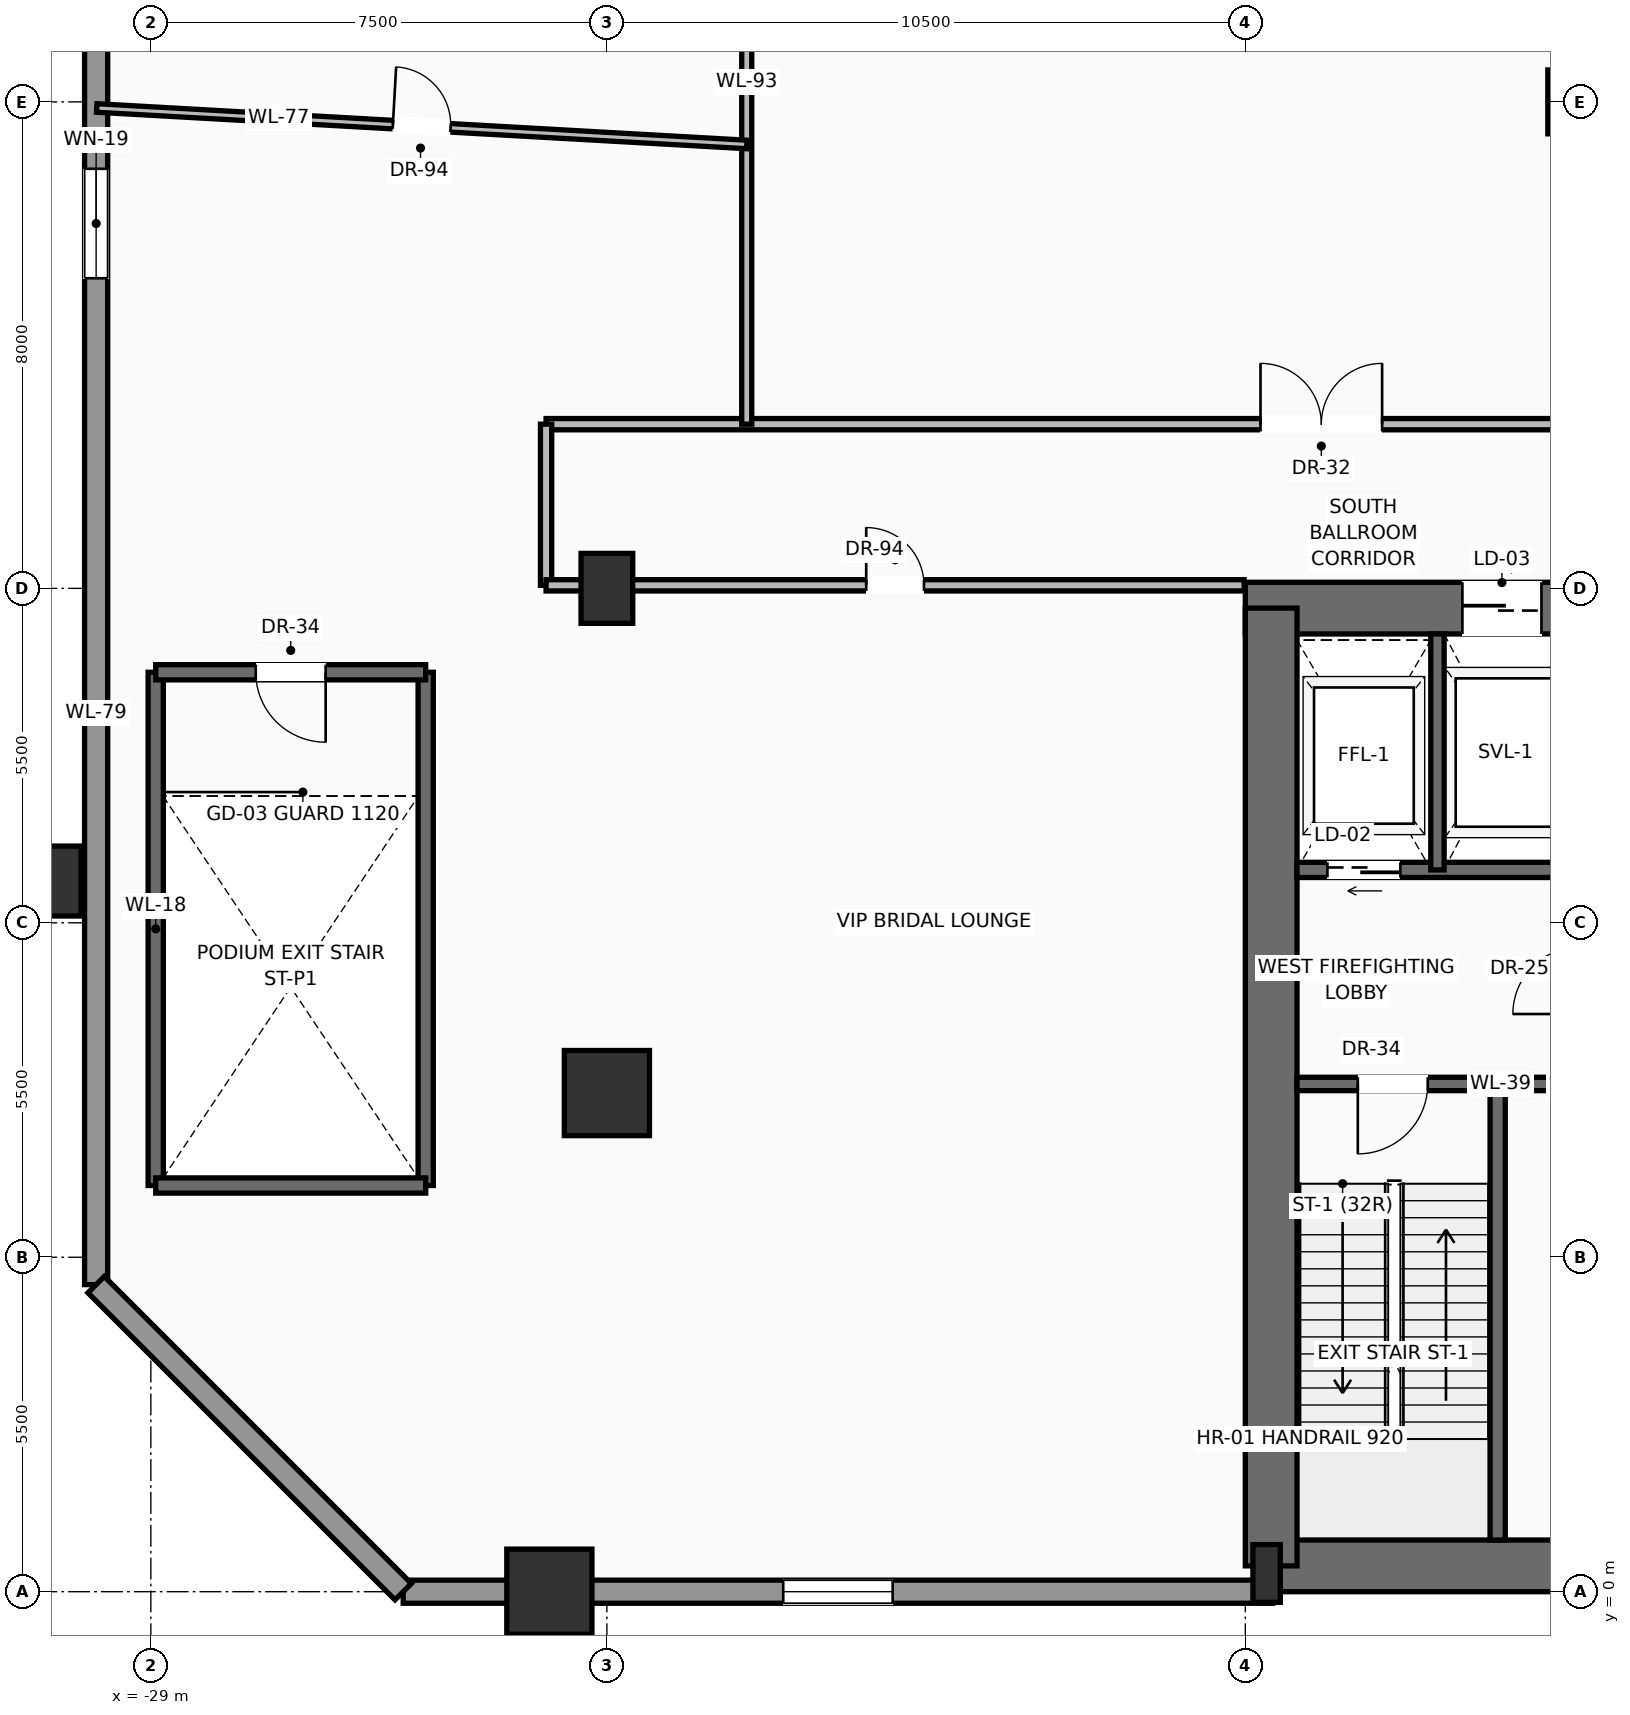
"""IFC4 building model, lengths in metres.
Left out: names, types, materials, properties, quantities, classifications, styles, units other than length and angle.
Written with IfcOpenShell. Run it as: python <this file> out.ifc"""

import sys

from ifc_helpers import new_model, si_unit, direction, frame, frame_2d, origin, origin_2d, place, context, subcontext, project, spatial, rectangle, hollow_rectangle, extrude, source, transform, mapped, element, fill, save


model = new_model("IFC4")
c1 = context("Model", 3, precision=1e-05, world=origin(), true_north=direction((0.0, 1.0)))
c2 = subcontext(c1, "Body", "Model", "MODEL_VIEW")
j1 = project(units=[si_unit("LENGTHUNIT", "METRE"), si_unit("PLANEANGLEUNIT", "RADIAN")], contexts=[c1])
p1 = place(None, origin())
s1 = spatial("IfcSite", under=j1, at=p1, CompositionType="ELEMENT")
p2 = place(p1, origin())
s2 = spatial("IfcBuilding", under=s1, at=p2, CompositionType="ELEMENT")
p3 = place(p2, frame((0.0, 0.0, 16.5)))
s3 = spatial("IfcBuildingStorey", under=s2, at=p3, CompositionType="ELEMENT", Elevation=16.5)
p4 = place(p3, frame((-10.65, 0.425, 0.0), z_axis=(0.0, 0.0, 1.0), x_axis=(1.0, 0.0, 0.0)))
e1 = element("IfcWall", 1, at=p4, inside=s3, PredefinedType="SHEAR", context=c2, shape_type="SweptSolid", body=[
    extrude(rectangle(XDim=21.3, YDim=0.85, at=frame_2d((10.65, 0.0))), origin(), (0.0, 0.0, 1.0), 5.05),
])
p5 = place(p3, frame((-11.0, 16.175, 0.0), z_axis=(0.0, 0.0, 1.0), x_axis=(1.0, 0.0, 0.0)))
e2 = element("IfcWall", 2, at=p5, inside=s3, PredefinedType="SHEAR", context=c2, shape_type="SweptSolid", body=[
    extrude(rectangle(XDim=22.0, YDim=0.85, at=frame_2d((11.0, 0.0))), origin(), (0.0, 0.0, 1.0), 5.05),
])
p6 = place(p5, frame((3.57, 0.0, 0.0)))
e3 = element("IfcOpeningElement", 3, at=p6, cuts=e2, PredefinedType="OPENING", context=c2, shape_type="SweptSolid", body=[
    extrude(rectangle(XDim=1.3, YDim=2.3, at=frame_2d((0.65, 1.15))), frame((0.0, 0.435, 0.0), z_axis=(0.0, -1.0, 0.0), x_axis=(1.0, 0.0, 0.0)), (0.0, 0.0, 1.0), 0.87),
])
p7 = place(p5, frame((10.0, 0.0, 0.0)))
e4 = element("IfcOpeningElement", 4, at=p7, cuts=e2, PredefinedType="OPENING", context=c2, shape_type="SweptSolid", body=[
    extrude(rectangle(XDim=2.0, YDim=2.4, at=frame_2d((1.0, 1.2))), frame((0.0, 0.435, 0.0), z_axis=(0.0, -1.0, 0.0), x_axis=(1.0, 0.0, 0.0)), (0.0, 0.0, 1.0), 0.87),
])
p8 = place(p3, frame((-10.575, 0.425, 0.0), z_axis=(0.0, 0.0, 1.0), x_axis=(0.0, 1.0, 0.0)))
e5 = element("IfcWall", 5, at=p8, inside=s3, PredefinedType="SHEAR", context=c2, shape_type="SweptSolid", body=[
    extrude(rectangle(XDim=15.75, YDim=0.85, at=frame_2d((7.875, 0.0))), origin(), (0.0, 0.0, 1.0), 5.05),
])
m1 = source(origin(), c2, "Body", "SweptSolid", [
    extrude(rectangle(XDim=0.45, YDim=0.95, at=origin_2d()), origin(), (0.0, 0.0, 1.0), 5.5),
])
p9 = place(p3, frame((-10.65, 0.3, 0.0), z_axis=(0.0, 0.0, 1.0), x_axis=(1.0, 0.0, 0.0)))
e6 = element("IfcColumn", 6, at=p9, inside=s3, PredefinedType="PILASTER", context=c2, shape_type="MappedRepresentation", body=[
    mapped(m1, transform((0.0, 0.0, 0.0), scale=1.0)),
])
m2 = source(origin(), c2, "Body", "SweptSolid", [
    extrude(rectangle(XDim=1.05, YDim=1.05, at=origin_2d()), origin(), (0.0, 0.0, 1.0), 5.5),
])
p10 = place(p3, frame((-5.5, 24.5, 0.0), z_axis=(0.0, 0.0, 1.0), x_axis=(1.0, 0.0, 0.0)))
e7 = element("IfcColumn", 7, at=p10, inside=s3, PredefinedType="COLUMN", context=c2, shape_type="MappedRepresentation", body=[
    mapped(m2, transform((0.0, 0.0, 0.0), scale=1.0)),
])
m3 = source(origin(), c2, "Body", "SweptSolid", [
    extrude(hollow_rectangle(XDim=1.4, YDim=1.4, WallThickness=0.07, at=origin_2d()), origin(), (0.0, 0.0, 1.0), 5.5),
])
for number, where, z_axis, x_axis in (
    (8, (-22.446, 0.0, 0.0), (0.0, 0.0, 1.0), (1.0, 0.0, 0.0)),
    (9, (-21.5, 8.2, 0.0), (0.0, 0.0, 1.0), (1.0, 0.0, 0.0)),
):
    element("IfcColumn", number, at=place(p3, frame(where, z_axis=z_axis, x_axis=x_axis)), inside=s3, PredefinedType="COLUMN", context=c2, shape_type="MappedRepresentation", body=[
        mapped(m3, transform((0.0, 0.0, 0.0), scale=1.0)),
    ])
m4 = source(origin(), c2, "Body", "SweptSolid", [
    extrude(rectangle(XDim=0.85, YDim=1.15, at=origin_2d()), origin(), (0.0, 0.0, 1.0), 5.5),
])
for number, where, z_axis, x_axis in (
    (10, (-21.5, 16.5, 0.0), (0.0, 0.0, 1.0), (1.0, 0.0, 0.0)),
    (11, (-30.573, 11.687, 0.0), (0.0, 0.0, 1.0), (1.0, 0.0, 0.0)),
):
    element("IfcColumn", number, at=place(p3, frame(where, z_axis=z_axis, x_axis=x_axis)), inside=s3, PredefinedType="COLUMN", context=c2, shape_type="MappedRepresentation", body=[
        mapped(m4, transform((0.0, 0.0, 0.0), scale=1.0)),
    ])
p11 = place(p3, frame((-29.9, 5.05, 0.0), z_axis=(0.0, 0.0, 1.0), x_axis=(0.0, 1.0, 0.0)))
e12 = element("IfcWall", 12, at=p11, inside=s3, PredefinedType="SOLIDWALL", context=c2, shape_type="SweptSolid", body=[
    extrude(rectangle(XDim=33.6, YDim=0.38, at=frame_2d((16.8, 0.0))), origin(), (0.0, 0.0, 1.0), 3.99),
])
p12 = place(p11, frame((16.55, 0.0, 0.95)))
e13 = element("IfcOpeningElement", 13, at=p12, cuts=e12, PredefinedType="OPENING", context=c2, shape_type="SweptSolid", body=[
    extrude(rectangle(XDim=1.8, YDim=2.4, at=frame_2d((0.9, 1.2))), frame((0.0, 0.2, 0.0), z_axis=(0.0, -1.0, 0.0), x_axis=(1.0, 0.0, 0.0)), (0.0, 0.0, 1.0), 0.4),
])
p13 = place(p11, frame((27.05, 0.0, 0.95)))
e14 = element("IfcOpeningElement", 14, at=p13, cuts=e12, PredefinedType="OPENING", context=c2, shape_type="SweptSolid", body=[
    extrude(rectangle(XDim=1.8, YDim=2.4, at=frame_2d((0.9, 1.2))), frame((0.0, 0.2, 0.0), z_axis=(0.0, -1.0, 0.0), x_axis=(1.0, 0.0, 0.0)), (0.0, 0.0, 1.0), 0.4),
])
p14 = place(p3, frame((-10.55, 0.0, 0.0), z_axis=(0.0, 0.0, 1.0), x_axis=(-1.0, 0.0, 0.0)))
e15 = element("IfcWall", 15, at=p14, inside=s3, PredefinedType="SOLIDWALL", context=c2, shape_type="SweptSolid", body=[
    extrude(rectangle(XDim=14.3, YDim=0.38, at=frame_2d((7.15, 0.0))), origin(), (0.0, 0.0, 1.0), 3.99),
])
p15 = place(p14, frame((6.25, 0.0, 0.95)))
e16 = element("IfcOpeningElement", 16, at=p15, cuts=e15, PredefinedType="OPENING", context=c2, shape_type="SweptSolid", body=[
    extrude(rectangle(XDim=1.8, YDim=2.4, at=frame_2d((0.9, 1.2))), frame((0.0, 0.2, 0.0), z_axis=(0.0, -1.0, 0.0), x_axis=(1.0, 0.0, 0.0)), (0.0, 0.0, 1.0), 0.4),
])
p16 = place(p3, frame((-24.85, 0.0, 0.0), z_axis=(0.0, 0.0, 1.0), x_axis=(-0.707089688307, 0.707123873653, 0.0)))
e17 = element("IfcWall", 17, at=p16, inside=s3, PredefinedType="SOLIDWALL", context=c2, shape_type="SweptSolid", body=[
    extrude(rectangle(XDim=7.142, YDim=0.38, at=frame_2d((3.571, 0.0))), origin(), (0.0, 0.0, 1.0), 3.99),
])
p17 = place(p3, frame((-6.85, 0.85, 0.0), z_axis=(0.0, 0.0, 1.0), x_axis=(0.0, 1.0, 0.0)))
e18 = element("IfcWall", 18, at=p17, inside=s3, PredefinedType="SOLIDWALL", context=c2, shape_type="SweptSolid", body=[
    extrude(rectangle(XDim=7.5, YDim=0.25, at=frame_2d((3.75, 0.0))), origin(), (0.0, 0.0, 1.0), 5.05),
])
p18 = place(p3, frame((-5.5, 8.35, 0.0), z_axis=(0.0, 0.0, 1.0), x_axis=(-1.0, 0.0, 0.0)))
e19 = element("IfcWall", 19, at=p18, inside=s3, PredefinedType="SOLIDWALL", context=c2, shape_type="SweptSolid", body=[
    extrude(rectangle(XDim=4.65, YDim=0.22, at=frame_2d((2.325, 0.0))), origin(), (0.0, 0.0, 1.0), 5.05),
])
p19 = place(p18, frame((2.5, 0.0, 0.0)))
e20 = element("IfcOpeningElement", 20, at=p19, cuts=e19, PredefinedType="OPENING", context=c2, shape_type="SweptSolid", body=[
    extrude(rectangle(XDim=1.15, YDim=2.2, at=frame_2d((0.575, 1.1))), frame((0.0, 0.12, 0.0), z_axis=(0.0, -1.0, 0.0), x_axis=(1.0, 0.0, 0.0)), (0.0, 0.0, 1.0), 0.24),
])
p20 = place(p3, frame((-5.5, 11.87, 0.0), z_axis=(0.0, 0.0, 1.0), x_axis=(-1.0, 0.0, 0.0)))
e21 = element("IfcWall", 21, at=p20, inside=s3, PredefinedType="SOLIDWALL", context=c2, shape_type="SweptSolid", body=[
    extrude(rectangle(XDim=4.65, YDim=0.25, at=frame_2d((2.325, 0.0))), origin(), (0.0, 0.0, 1.0), 5.05),
])
p21 = place(p20, frame((2.95, 0.0, 0.0)))
e22 = element("IfcOpeningElement", 22, at=p21, cuts=e21, PredefinedType="OPENING", context=c2, shape_type="SweptSolid", body=[
    extrude(rectangle(XDim=1.2, YDim=2.25, at=frame_2d((0.6, 1.125))), frame((0.0, 0.135, 0.0), z_axis=(0.0, -1.0, 0.0), x_axis=(1.0, 0.0, 0.0)), (0.0, 0.0, 1.0), 0.27),
])
p22 = place(p3, frame((-7.84, 11.87, 0.0), z_axis=(0.0, 0.0, 1.0), x_axis=(0.0, 1.0, 0.0)))
e23 = element("IfcWall", 23, at=p22, inside=s3, PredefinedType="SOLIDWALL", context=c2, shape_type="SweptSolid", body=[
    extrude(rectangle(XDim=3.88, YDim=0.22, at=frame_2d((1.94, 0.0))), origin(), (0.0, 0.0, 1.0), 5.05),
])
for number, where, z_axis, x_axis in (
    (24, (-28.92, 6.68, 0.0), (0.0, 0.0, 1.0), (0.0, 1.0, 0.0)),
    (25, (-24.48, 6.68, 0.0), (0.0, 0.0, 1.0), (0.0, 1.0, 0.0)),
):
    element("IfcWall", number, at=place(p3, frame(where, z_axis=z_axis, x_axis=x_axis)), inside=s3, PredefinedType="SOLIDWALL", context=c2, shape_type="SweptSolid", body=[
        extrude(rectangle(XDim=8.44, YDim=0.25, at=frame_2d((4.22, 0.0))), origin(), (0.0, 0.0, 1.0), 5.05),
    ])
p23 = place(p3, frame((-28.92, 6.68, 0.0), z_axis=(0.0, 0.0, 1.0), x_axis=(1.0, 0.0, 0.0)))
e26 = element("IfcWall", 26, at=p23, inside=s3, PredefinedType="SOLIDWALL", context=c2, shape_type="SweptSolid", body=[
    extrude(rectangle(XDim=4.44, YDim=0.25, at=frame_2d((2.22, 0.0))), origin(), (0.0, 0.0, 1.0), 5.05),
])
p24 = place(p3, frame((-24.48, 15.12, 0.0), z_axis=(0.0, 0.0, 1.0), x_axis=(-1.0, 0.0, 0.0)))
e27 = element("IfcWall", 27, at=p24, inside=s3, PredefinedType="SOLIDWALL", context=c2, shape_type="SweptSolid", body=[
    extrude(rectangle(XDim=4.44, YDim=0.25, at=frame_2d((2.22, 0.0))), origin(), (0.0, 0.0, 1.0), 5.05),
])
p25 = place(p24, frame((1.645, 0.0, 0.0)))
e28 = element("IfcOpeningElement", 28, at=p25, cuts=e27, PredefinedType="OPENING", context=c2, shape_type="SweptSolid", body=[
    extrude(rectangle(XDim=1.15, YDim=2.2, at=frame_2d((0.575, 1.1))), frame((0.0, 0.135, 0.0), z_axis=(0.0, -1.0, 0.0), x_axis=(1.0, 0.0, 0.0)), (0.0, 0.0, 1.0), 0.27),
])
p26 = place(p3, frame((-22.5, 19.2, 0.0), z_axis=(0.0, 0.0, 1.0), x_axis=(1.0, 0.0, 0.0)))
e29 = element("IfcWall", 29, at=p26, inside=s3, PredefinedType="PARTITIONING", context=c2, shape_type="SweptSolid", body=[
    extrude(rectangle(XDim=45.0, YDim=0.185, at=frame_2d((22.5, 0.0))), origin(), (0.0, 0.0, 1.0), 4.002),
])
p27 = place(p26, frame((11.75, 0.0, 0.0)))
e30 = element("IfcOpeningElement", 30, at=p27, cuts=e29, PredefinedType="OPENING", context=c2, shape_type="SweptSolid", body=[
    extrude(rectangle(XDim=2.0, YDim=2.4, at=frame_2d((1.0, 1.2))), frame((0.0, 0.103, 0.0), z_axis=(0.0, -1.0, 0.0), x_axis=(1.0, 0.0, 0.0)), (0.0, 0.0, 1.0), 0.205),
])
p28 = place(p26, frame((31.25, 0.0, 0.0)))
e31 = element("IfcOpeningElement", 31, at=p28, cuts=e29, PredefinedType="OPENING", context=c2, shape_type="SweptSolid", body=[
    extrude(rectangle(XDim=2.0, YDim=2.4, at=frame_2d((1.0, 1.2))), frame((0.0, 0.103, 0.0), z_axis=(0.0, -1.0, 0.0), x_axis=(1.0, 0.0, 0.0)), (0.0, 0.0, 1.0), 0.205),
])
p29 = place(p3, frame((-22.5, 16.55, 0.0), z_axis=(0.0, 0.0, 1.0), x_axis=(0.0, 1.0, 0.0)))
e32 = element("IfcWall", 32, at=p29, inside=s3, PredefinedType="PARTITIONING", context=c2, shape_type="SweptSolid", body=[
    extrude(rectangle(XDim=2.65, YDim=0.185, at=frame_2d((1.325, 0.0))), origin(), (0.0, 0.0, 1.0), 5.042),
])
p30 = place(p3, frame((-22.5, 16.55, 0.0), z_axis=(0.0, 0.0, 1.0), x_axis=(1.0, 0.0, 0.0)))
e33 = element("IfcWall", 33, at=p30, inside=s3, PredefinedType="PARTITIONING", context=c2, shape_type="SweptSolid", body=[
    extrude(rectangle(XDim=11.48, YDim=0.185, at=frame_2d((5.74, 0.0))), origin(), (0.0, 0.0, 1.0), 4.002),
])
p31 = place(p30, frame((5.265, 0.0, 0.0)))
e34 = element("IfcOpeningElement", 34, at=p31, cuts=e33, PredefinedType="OPENING", context=c2, shape_type="SweptSolid", body=[
    extrude(rectangle(XDim=0.95, YDim=2.2, at=frame_2d((0.475, 1.1))), frame((0.0, 0.103, 0.0), z_axis=(0.0, -1.0, 0.0), x_axis=(1.0, 0.0, 0.0)), (0.0, 0.0, 1.0), 0.205),
])
p32 = place(p3, frame((-19.2, 19.2, 0.0), z_axis=(0.0, 0.0, 1.0), x_axis=(0.0, 1.0, 0.0)))
e35 = element("IfcWall", 35, at=p32, inside=s3, PredefinedType="PARTITIONING", context=c2, shape_type="SweptSolid", body=[
    extrude(rectangle(XDim=20.1, YDim=0.165, at=frame_2d((10.05, 0.0))), origin(), (0.0, 0.0, 1.0), 4.002),
])
p33 = place(p32, frame((8.329, 0.0, 0.0)))
e36 = element("IfcOpeningElement", 36, at=p33, cuts=e35, PredefinedType="OPENING", context=c2, shape_type="SweptSolid", body=[
    extrude(rectangle(XDim=1.5, YDim=2.25, at=frame_2d((0.75, 1.125))), frame((0.0, 0.093, 0.0), z_axis=(0.0, -1.0, 0.0), x_axis=(1.0, 0.0, 0.0)), (0.0, 0.0, 1.0), 0.185),
])
p34 = place(p3, frame((-29.89, 24.4, 0.0), z_axis=(0.0, 0.0, 1.0), x_axis=(0.99842932753, -0.056025689895, 0.0)))
e37 = element("IfcWall", 37, at=p34, inside=s3, PredefinedType="PARTITIONING", context=c2, shape_type="SweptSolid", body=[
    extrude(rectangle(XDim=10.707, YDim=0.14, at=frame_2d((5.354, 0.0))), origin(), (0.0, 0.0, 1.0), 4.115),
])
p35 = place(p34, frame((4.878, 0.0, 0.0)))
e38 = element("IfcOpeningElement", 38, at=p35, cuts=e37, PredefinedType="OPENING", context=c2, shape_type="SweptSolid", body=[
    extrude(rectangle(XDim=0.95, YDim=2.2, at=frame_2d((0.475, 1.1))), frame((0.0, 0.08, 0.0), z_axis=(0.0, -1.0, 0.0), x_axis=(1.0, 0.0, 0.0)), (0.0, 0.0, 1.0), 0.16),
])
m5 = source(origin(), c2, "Body", "SweptSolid", [
    extrude(rectangle(XDim=1.8, YDim=2.4, at=frame_2d((0.9, 1.2))), frame((0.0, 0.03, 0.0), z_axis=(0.0, -1.0, 0.0), x_axis=(1.0, 0.0, 0.0)), (0.0, 0.0, 1.0), 0.06),
])
p36 = place(p12, origin())
e39 = element("IfcWindow", 39, at=p36, inside=s3, PartitioningType="SINGLE_PANEL", PredefinedType="WINDOW", context=c2, shape_type="MappedRepresentation", body=[
    mapped(m5, transform((0.0, 0.0, 0.0), scale=1.0)),
])
fill(e13, e39)
p37 = place(p15, origin())
e40 = element("IfcWindow", 40, at=p37, inside=s3, PartitioningType="SINGLE_PANEL", PredefinedType="WINDOW", context=c2, shape_type="MappedRepresentation", body=[
    mapped(m5, transform((0.0, 0.0, 0.0), scale=1.0)),
])
fill(e16, e40)
m6 = source(origin(), c2, "Body", "SweptSolid", [
    extrude(rectangle(XDim=1.15, YDim=2.2, at=frame_2d((0.575, 1.1))), frame((0.0, 0.025, 0.0), z_axis=(0.0, -1.0, 0.0), x_axis=(1.0, 0.0, 0.0)), (0.0, 0.0, 1.0), 0.05),
])
p38 = place(p19, origin())
e41 = element("IfcDoor", 41, at=p38, inside=s3, OperationType="SINGLE_SWING_RIGHT", PredefinedType="DOOR", context=c2, shape_type="MappedRepresentation", body=[
    mapped(m6, transform((0.0, 0.0, 0.0), scale=1.0)),
])
fill(e20, e41)
m7 = source(origin(), c2, "Body", "SweptSolid", [
    extrude(rectangle(XDim=1.2, YDim=2.25, at=frame_2d((0.6, 1.125))), frame((0.0, 0.025, 0.0), z_axis=(0.0, -1.0, 0.0), x_axis=(1.0, 0.0, 0.0)), (0.0, 0.0, 1.0), 0.05),
])
p39 = place(p21, origin())
e42 = element("IfcDoor", 42, at=p39, inside=s3, OperationType="SLIDING_TO_LEFT", PredefinedType="DOOR", context=c2, shape_type="MappedRepresentation", body=[
    mapped(m7, transform((0.0, 0.0, 0.0), scale=1.0)),
])
fill(e22, e42)
m8 = source(origin(), c2, "Body", "SweptSolid", [
    extrude(rectangle(XDim=1.3, YDim=2.3, at=frame_2d((0.65, 1.15))), frame((0.0, 0.025, 0.0), z_axis=(0.0, -1.0, 0.0), x_axis=(1.0, 0.0, 0.0)), (0.0, 0.0, 1.0), 0.05),
])
p40 = place(p6, origin())
e43 = element("IfcDoor", 43, at=p40, inside=s3, OperationType="SLIDING_TO_RIGHT", PredefinedType="DOOR", context=c2, shape_type="MappedRepresentation", body=[
    mapped(m8, transform((0.0, 0.0, 0.0), scale=1.0)),
])
fill(e3, e43)
p41 = place(p25, origin())
e44 = element("IfcDoor", 44, at=p41, inside=s3, OperationType="SINGLE_SWING_LEFT", PredefinedType="DOOR", context=c2, shape_type="MappedRepresentation", body=[
    mapped(m6, transform((0.0, 0.0, 0.0), scale=1.0)),
])
fill(e28, e44)
m9 = source(origin(), c2, "Body", "SweptSolid", [
    extrude(rectangle(XDim=2.0, YDim=2.4, at=frame_2d((1.0, 1.2))), frame((0.0, 0.025, 0.0), z_axis=(0.0, -1.0, 0.0), x_axis=(1.0, 0.0, 0.0)), (0.0, 0.0, 1.0), 0.05),
])
p42 = place(p27, origin())
e45 = element("IfcDoor", 45, at=p42, inside=s3, OperationType="DOUBLE_DOOR_SINGLE_SWING", PredefinedType="DOOR", context=c2, shape_type="MappedRepresentation", body=[
    mapped(m9, transform((0.0, 0.0, 0.0), scale=1.0)),
])
fill(e30, e45)
m10 = source(origin(), c2, "Body", "SweptSolid", [
    extrude(rectangle(XDim=0.95, YDim=2.2, at=frame_2d((0.475, 1.1))), frame((0.0, 0.025, 0.0), z_axis=(0.0, -1.0, 0.0), x_axis=(1.0, 0.0, 0.0)), (0.0, 0.0, 1.0), 0.05),
])
p43 = place(p31, origin())
e46 = element("IfcDoor", 46, at=p43, inside=s3, OperationType="SINGLE_SWING_LEFT", PredefinedType="DOOR", context=c2, shape_type="MappedRepresentation", body=[
    mapped(m10, transform((0.0, 0.0, 0.0), scale=1.0)),
])
fill(e34, e46)
p44 = place(p35, origin())
e47 = element("IfcDoor", 47, at=p44, inside=s3, OperationType="SINGLE_SWING_LEFT", PredefinedType="DOOR", context=c2, shape_type="MappedRepresentation", body=[
    mapped(m10, transform((0.0, 0.0, 0.0), scale=1.0)),
])
fill(e38, e47)
save(model, sys.argv[1])
